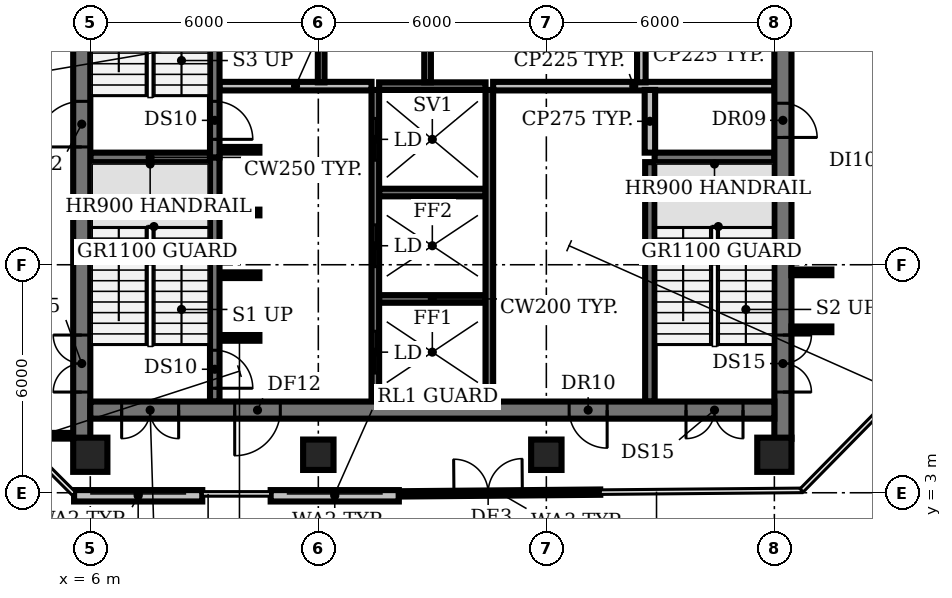
"""IFC4 building model, lengths in metres.
Left out: names, types, materials, properties, quantities, classifications, styles, units other than length and angle.
Written with IfcOpenShell. Run it as: python <this file> out.ifc"""

import sys

from ifc_helpers import new_model, si_unit, direction, frame, frame_2d, origin, origin_2d, place, context, subcontext, project, spatial, rectangle, circle, extrude, element, fill, save


model = new_model("IFC4")
c1 = context("Model", 3, precision=1e-05, world=origin(), true_north=direction((0.0, 1.0)))
c2 = subcontext(c1, "Body", "Model", "MODEL_VIEW")
j1 = project(units=[si_unit("LENGTHUNIT", "METRE"), si_unit("PLANEANGLEUNIT", "RADIAN")], contexts=[c1])
p1 = place(None, origin())
s1 = spatial("IfcSite", under=j1, at=p1, CompositionType="ELEMENT")
p2 = place(p1, origin())
s2 = spatial("IfcBuilding", under=s1, at=p2, CompositionType="ELEMENT")
p3 = place(p2, frame((0.0, 0.0, 226.4)))
s3 = spatial("IfcBuildingStorey", under=s2, at=p3, CompositionType="ELEMENT", Elevation=226.4)
p4 = place(p3, frame((6.0, 4.0, 0.0), z_axis=(0.0, 0.0, 1.0), x_axis=(1.0, 0.0, 0.0)))
e1 = element("IfcColumn", 1, at=p4, inside=s3, PredefinedType="COLUMN", context=c2, shape_type="SweptSolid", body=[
    extrude(circle(Radius=0.45, at=origin_2d()), origin(), (0.0, 0.0, 1.0), 3.85),
])
for number, where, z_axis, x_axis in (
    (2, (12.0, 4.0, 0.0), (0.0, 0.0, 1.0), (1.0, 0.0, 0.0)),
    (3, (18.0, 4.0, 0.0), (0.0, 0.0, 1.0), (1.0, 0.0, 0.0)),
):
    element("IfcColumn", number, at=place(p3, frame(where, z_axis=z_axis, x_axis=x_axis)), inside=s3, PredefinedType="COLUMN", context=c2, shape_type="SweptSolid", body=[
        extrude(rectangle(XDim=0.8, YDim=0.8, at=origin_2d()), origin(), (0.0, 0.0, 1.0), 3.85),
    ])
p5 = place(p3, frame((24.0, 4.0, 0.0), z_axis=(0.0, 0.0, 1.0), x_axis=(1.0, 0.0, 0.0)))
e4 = element("IfcColumn", 4, at=p5, inside=s3, PredefinedType="COLUMN", context=c2, shape_type="SweptSolid", body=[
    extrude(circle(Radius=0.45, at=origin_2d()), origin(), (0.0, 0.0, 1.0), 3.85),
])
p6 = place(p3, frame((5.573, 2.92, 0.0), z_axis=(0.0, 0.0, 1.0), x_axis=(1.0, 0.0, 0.0)))
e5 = element("IfcWall", 5, at=p6, inside=s3, PredefinedType="SOLIDWALL", context=c2, shape_type="SweptSolid", body=[
    extrude(rectangle(XDim=3.373, YDim=0.3, at=frame_2d((1.686, 0.0))), origin(), (0.0, 0.0, 1.0), 3.85),
])
p7 = place(p3, frame((10.746, 2.92, 0.0), z_axis=(0.0, 0.0, 1.0), x_axis=(1.0, 0.0, 0.0)))
e6 = element("IfcWall", 6, at=p7, inside=s3, PredefinedType="SOLIDWALL", context=c2, shape_type="SweptSolid", body=[
    extrude(rectangle(XDim=3.373, YDim=0.3, at=frame_2d((1.687, 0.0))), origin(), (0.0, 0.0, 1.0), 3.85),
])
p8 = place(p3, frame((14.119, 2.97, 0.0), z_axis=(0.0, 0.0, 1.0), x_axis=(0.999962093881, 0.00870693982, 0.0)))
e7 = element("IfcWall", 7, at=p8, inside=s3, PredefinedType="SOLIDWALL", context=c2, shape_type="SweptSolid", body=[
    extrude(rectangle(XDim=5.3, YDim=0.14, at=frame_2d((2.65, 0.0))), origin(), (0.0, 0.0, 1.0), 3.85),
])
p9 = place(p8, frame((1.45, 0.0, 0.0)))
e8 = element("IfcOpeningElement", 8, at=p9, cuts=e7, PredefinedType="OPENING", context=c2, shape_type="SweptSolid", body=[
    extrude(rectangle(XDim=1.8, YDim=2.4, at=frame_2d((0.9, 1.2))), frame((0.0, 0.08, 0.0), z_axis=(0.0, -1.0, 0.0), x_axis=(1.0, 0.0, 0.0)), (0.0, 0.0, 1.0), 0.16),
])
p10 = place(p3, frame((9.4, 7.075, 0.0), z_axis=(0.0, 0.0, 1.0), x_axis=(1.0, 0.0, 0.0)))
e9 = element("IfcWall", 9, at=p10, inside=s3, PredefinedType="SHEAR", context=c2, shape_type="SweptSolid", body=[
    extrude(rectangle(XDim=1.05, YDim=0.15, at=frame_2d((0.525, 0.0))), origin(), (0.0, 0.0, 1.0), 3.85),
])
p11 = place(p3, frame((13.6, 8.1, 0.0), z_axis=(0.0, 0.0, 1.0), x_axis=(1.0, 0.0, 0.0)))
e10 = element("IfcWall", 10, at=p11, inside=s3, PredefinedType="SHEAR", context=c2, shape_type="SweptSolid", body=[
    extrude(rectangle(XDim=2.8, YDim=0.2, at=frame_2d((1.4, 0.0))), origin(), (0.0, 0.0, 1.0), 3.85),
])
for number, where, z_axis, x_axis in (
    (11, (9.4, 8.725, 0.0), (0.0, 0.0, 1.0), (1.0, 0.0, 0.0)),
    (12, (9.4, 10.375, 0.0), (0.0, 0.0, 1.0), (1.0, 0.0, 0.0)),
):
    element("IfcWall", number, at=place(p3, frame(where, z_axis=z_axis, x_axis=x_axis)), inside=s3, PredefinedType="SHEAR", context=c2, shape_type="SweptSolid", body=[
        extrude(rectangle(XDim=1.05, YDim=0.15, at=frame_2d((0.525, 0.0))), origin(), (0.0, 0.0, 1.0), 3.85),
    ])
p12 = place(p3, frame((13.6, 10.9, 0.0), z_axis=(0.0, 0.0, 1.0), x_axis=(1.0, 0.0, 0.0)))
e13 = element("IfcWall", 13, at=p12, inside=s3, PredefinedType="SHEAR", context=c2, shape_type="SweptSolid", body=[
    extrude(rectangle(XDim=2.8, YDim=0.2, at=frame_2d((1.4, 0.0))), origin(), (0.0, 0.0, 1.0), 3.85),
])
for number, where, z_axis, x_axis in (
    (14, (6.0, 11.825, 0.0), (0.0, 0.0, 1.0), (1.0, 0.0, 0.0)),
    (15, (20.85, 11.825, 0.0), (0.0, 0.0, 1.0), (1.0, 0.0, 0.0)),
):
    element("IfcWall", number, at=place(p3, frame(where, z_axis=z_axis, x_axis=x_axis)), inside=s3, PredefinedType="SHEAR", context=c2, shape_type="SweptSolid", body=[
        extrude(rectangle(XDim=3.15, YDim=0.25, at=frame_2d((1.575, 0.0))), origin(), (0.0, 0.0, 1.0), 3.85),
    ])
p13 = place(p3, frame((9.4, 12.025, 0.0), z_axis=(0.0, 0.0, 1.0), x_axis=(1.0, 0.0, 0.0)))
e16 = element("IfcWall", 16, at=p13, inside=s3, PredefinedType="SHEAR", context=c2, shape_type="SweptSolid", body=[
    extrude(rectangle(XDim=1.05, YDim=0.15, at=frame_2d((0.525, 0.0))), origin(), (0.0, 0.0, 1.0), 3.85),
])
p14 = place(p3, frame((9.4, 13.7, 0.0), z_axis=(0.0, 0.0, 1.0), x_axis=(1.0, 0.0, 0.0)))
e17 = element("IfcWall", 17, at=p14, inside=s3, PredefinedType="PARTITIONING", context=c2, shape_type="SweptSolid", body=[
    extrude(rectangle(XDim=4.0, YDim=0.225, at=frame_2d((2.0, 0.0))), origin(), (0.0, 0.0, 1.0), 3.85),
])
p15 = place(p3, frame((13.6, 13.7, 0.0), z_axis=(0.0, 0.0, 1.0), x_axis=(1.0, 0.0, 0.0)))
e18 = element("IfcWall", 18, at=p15, inside=s3, PredefinedType="SHEAR", context=c2, shape_type="SweptSolid", body=[
    extrude(rectangle(XDim=2.8, YDim=0.2, at=frame_2d((1.4, 0.0))), origin(), (0.0, 0.0, 1.0), 3.85),
])
p16 = place(p3, frame((16.6, 13.7, 0.0), z_axis=(0.0, 0.0, 1.0), x_axis=(1.0, 0.0, 0.0)))
e19 = element("IfcWall", 19, at=p16, inside=s3, PredefinedType="PARTITIONING", context=c2, shape_type="SweptSolid", body=[
    extrude(rectangle(XDim=7.4, YDim=0.225, at=frame_2d((3.7, 0.0))), origin(), (0.0, 0.0, 1.0), 3.85),
])
p17 = place(p3, frame((9.275, 11.825, 0.0), z_axis=(0.0, 0.0, 1.0), x_axis=(0.0, -1.0, 0.0)))
e20 = element("IfcWall", 20, at=p17, inside=s3, PredefinedType="SHEAR", context=c2, shape_type="SweptSolid", body=[
    extrude(rectangle(XDim=6.425, YDim=0.25, at=frame_2d((3.212, 0.0))), origin(), (0.0, 0.0, 1.0), 3.85),
])
p18 = place(p17, frame((5.075, 0.0, 0.0)))
e21 = element("IfcOpeningElement", 21, at=p18, cuts=e20, PredefinedType="OPENING", context=c2, shape_type="SweptSolid", body=[
    extrude(rectangle(XDim=1.0, YDim=2.1, at=frame_2d((0.5, 1.05))), frame((0.0, 0.135, 0.0), z_axis=(0.0, -1.0, 0.0), x_axis=(1.0, 0.0, 0.0)), (0.0, 0.0, 1.0), 0.27),
])
p19 = place(p3, frame((9.275, 18.375, 0.0), z_axis=(0.0, 0.0, 1.0), x_axis=(0.0, -1.0, 0.0)))
e22 = element("IfcWall", 22, at=p19, inside=s3, PredefinedType="SHEAR", context=c2, shape_type="SweptSolid", body=[
    extrude(rectangle(XDim=6.55, YDim=0.25, at=frame_2d((3.275, 0.0))), origin(), (0.0, 0.0, 1.0), 3.85),
])
p20 = place(p19, frame((5.075, 0.0, 0.0)))
e23 = element("IfcOpeningElement", 23, at=p20, cuts=e22, PredefinedType="OPENING", context=c2, shape_type="SweptSolid", body=[
    extrude(rectangle(XDim=1.0, YDim=2.1, at=frame_2d((0.5, 1.05))), frame((0.0, 0.135, 0.0), z_axis=(0.0, -1.0, 0.0), x_axis=(1.0, 0.0, 0.0)), (0.0, 0.0, 1.0), 0.27),
])
p21 = place(p3, frame((12.075, 13.8, 0.0), z_axis=(0.0, 0.0, 1.0), x_axis=(0.0, 1.0, 0.0)))
e24 = element("IfcWall", 24, at=p21, inside=s3, PredefinedType="PARTITIONING", context=c2, shape_type="SweptSolid", body=[
    extrude(rectangle(XDim=2.6, YDim=0.175, at=frame_2d((1.3, 0.0))), origin(), (0.0, 0.0, 1.0), 3.85),
])
p22 = place(p3, frame((13.5, 5.4, 0.0), z_axis=(0.0, 0.0, 1.0), x_axis=(0.0, 1.0, 0.0)))
e25 = element("IfcWall", 25, at=p22, inside=s3, PredefinedType="SHEAR", context=c2, shape_type="SweptSolid", body=[
    extrude(rectangle(XDim=8.2, YDim=0.2, at=frame_2d((4.1, 0.0))), origin(), (0.0, 0.0, 1.0), 3.85),
])
p23 = place(p22, frame((0.75, 0.0, 0.0)))
e26 = element("IfcOpeningElement", 26, at=p23, cuts=e25, PredefinedType="OPENING", context=c2, shape_type="SweptSolid", body=[
    extrude(rectangle(XDim=1.1, YDim=2.1, at=frame_2d((0.55, 1.05))), frame((0.0, 0.11, 0.0), z_axis=(0.0, -1.0, 0.0), x_axis=(1.0, 0.0, 0.0)), (0.0, 0.0, 1.0), 0.22),
])
p24 = place(p22, frame((3.55, 0.0, 0.0)))
e27 = element("IfcOpeningElement", 27, at=p24, cuts=e25, PredefinedType="OPENING", context=c2, shape_type="SweptSolid", body=[
    extrude(rectangle(XDim=1.1, YDim=2.1, at=frame_2d((0.55, 1.05))), frame((0.0, 0.11, 0.0), z_axis=(0.0, -1.0, 0.0), x_axis=(1.0, 0.0, 0.0)), (0.0, 0.0, 1.0), 0.22),
])
p25 = place(p22, frame((6.35, 0.0, 0.0)))
e28 = element("IfcOpeningElement", 28, at=p25, cuts=e25, PredefinedType="OPENING", context=c2, shape_type="SweptSolid", body=[
    extrude(rectangle(XDim=1.1, YDim=2.1, at=frame_2d((0.55, 1.05))), frame((0.0, 0.11, 0.0), z_axis=(0.0, -1.0, 0.0), x_axis=(1.0, 0.0, 0.0)), (0.0, 0.0, 1.0), 0.22),
])
p26 = place(p3, frame((14.875, 13.8, 0.0), z_axis=(0.0, 0.0, 1.0), x_axis=(0.0, 1.0, 0.0)))
e29 = element("IfcWall", 29, at=p26, inside=s3, PredefinedType="PARTITIONING", context=c2, shape_type="SweptSolid", body=[
    extrude(rectangle(XDim=2.6, YDim=0.175, at=frame_2d((1.3, 0.0))), origin(), (0.0, 0.0, 1.0), 3.85),
])
p27 = place(p3, frame((16.5, 5.4, 0.0), z_axis=(0.0, 0.0, 1.0), x_axis=(0.0, 1.0, 0.0)))
e30 = element("IfcWall", 30, at=p27, inside=s3, PredefinedType="SHEAR", context=c2, shape_type="SweptSolid", body=[
    extrude(rectangle(XDim=8.2, YDim=0.2, at=frame_2d((4.1, 0.0))), origin(), (0.0, 0.0, 1.0), 3.85),
])
p28 = place(p3, frame((20.5, 13.8, 0.0), z_axis=(0.0, 0.0, 1.0), x_axis=(0.0, 1.0, 0.0)))
e31 = element("IfcWall", 31, at=p28, inside=s3, PredefinedType="PARTITIONING", context=c2, shape_type="SweptSolid", body=[
    extrude(rectangle(XDim=2.6, YDim=0.225, at=frame_2d((1.3, 0.0))), origin(), (0.0, 0.0, 1.0), 3.85),
])
p29 = place(p3, frame((20.725, 5.4, 0.0), z_axis=(0.0, 0.0, 1.0), x_axis=(0.0, 1.0, 0.0)))
e32 = element("IfcWall", 32, at=p29, inside=s3, PredefinedType="SHEAR", context=c2, shape_type="SweptSolid", body=[
    extrude(rectangle(XDim=6.3, YDim=0.25, at=frame_2d((3.15, 0.0))), origin(), (0.0, 0.0, 1.0), 3.85),
])
p30 = place(p3, frame((20.725, 11.95, 0.0), z_axis=(0.0, 0.0, 1.0), x_axis=(0.0, 1.0, 0.0)))
e33 = element("IfcWall", 33, at=p30, inside=s3, PredefinedType="PARTITIONING", context=c2, shape_type="SweptSolid", body=[
    extrude(rectangle(XDim=1.65, YDim=0.275, at=frame_2d((0.825, 0.0))), origin(), (0.0, 0.0, 1.0), 3.85),
])
p31 = place(p3, frame((5.775, 4.42, 0.0), z_axis=(0.0, 0.0, 1.0), x_axis=(0.0, 1.0, 0.0)))
e34 = element("IfcWall", 34, at=p31, inside=s3, PredefinedType="SHEAR", context=c2, shape_type="SweptSolid", body=[
    extrude(rectangle(XDim=20.83, YDim=0.45, at=frame_2d((10.415, 0.0))), origin(), (0.0, 0.0, 1.0), 3.85),
])
p32 = place(p31, frame((1.23, 0.0, 0.0)))
e35 = element("IfcOpeningElement", 35, at=p32, cuts=e34, PredefinedType="OPENING", context=c2, shape_type="SweptSolid", body=[
    extrude(rectangle(XDim=1.5, YDim=2.1, at=frame_2d((0.75, 1.05))), frame((0.0, 0.235, 0.0), z_axis=(0.0, -1.0, 0.0), x_axis=(1.0, 0.0, 0.0)), (0.0, 0.0, 1.0), 0.47),
])
p33 = place(p31, frame((7.68, 0.0, 0.0)))
e36 = element("IfcOpeningElement", 36, at=p33, cuts=e34, PredefinedType="OPENING", context=c2, shape_type="SweptSolid", body=[
    extrude(rectangle(XDim=1.2, YDim=2.1, at=frame_2d((0.6, 1.05))), frame((0.0, 0.235, 0.0), z_axis=(0.0, -1.0, 0.0), x_axis=(1.0, 0.0, 0.0)), (0.0, 0.0, 1.0), 0.47),
])
p34 = place(p31, frame((14.23, 0.0, 0.0)))
e37 = element("IfcOpeningElement", 37, at=p34, cuts=e34, PredefinedType="OPENING", context=c2, shape_type="SweptSolid", body=[
    extrude(rectangle(XDim=1.2, YDim=2.1, at=frame_2d((0.6, 1.05))), frame((0.0, 0.235, 0.0), z_axis=(0.0, -1.0, 0.0), x_axis=(1.0, 0.0, 0.0)), (0.0, 0.0, 1.0), 0.47),
])
p35 = place(p3, frame((24.225, 25.25, 0.0), z_axis=(0.0, 0.0, 1.0), x_axis=(0.0, -1.0, 0.0)))
e38 = element("IfcWall", 38, at=p35, inside=s3, PredefinedType="SHEAR", context=c2, shape_type="SweptSolid", body=[
    extrude(rectangle(XDim=20.83, YDim=0.45, at=frame_2d((10.415, 0.0))), origin(), (0.0, 0.0, 1.0), 3.85),
])
p36 = place(p35, frame((18.1, 0.0, 0.0)))
e39 = element("IfcOpeningElement", 39, at=p36, cuts=e38, PredefinedType="OPENING", context=c2, shape_type="SweptSolid", body=[
    extrude(rectangle(XDim=1.5, YDim=2.1, at=frame_2d((0.75, 1.05))), frame((0.0, 0.235, 0.0), z_axis=(0.0, -1.0, 0.0), x_axis=(1.0, 0.0, 0.0)), (0.0, 0.0, 1.0), 0.47),
])
p37 = place(p35, frame((12.0, 0.0, 0.0)))
e40 = element("IfcOpeningElement", 40, at=p37, cuts=e38, PredefinedType="OPENING", context=c2, shape_type="SweptSolid", body=[
    extrude(rectangle(XDim=0.9, YDim=2.1, at=frame_2d((0.45, 1.05))), frame((0.0, 0.235, 0.0), z_axis=(0.0, -1.0, 0.0), x_axis=(1.0, 0.0, 0.0)), (0.0, 0.0, 1.0), 0.47),
])
p38 = place(p35, frame((6.0, 0.0, 0.0)))
e41 = element("IfcOpeningElement", 41, at=p38, cuts=e38, PredefinedType="OPENING", context=c2, shape_type="SweptSolid", body=[
    extrude(rectangle(XDim=2.0, YDim=2.1, at=frame_2d((1.0, 1.05))), frame((0.0, 0.235, 0.0), z_axis=(0.0, -1.0, 0.0), x_axis=(1.0, 0.0, 0.0)), (0.0, 0.0, 1.0), 0.47),
])
p39 = place(p3, frame((24.0, 5.175, 0.0), z_axis=(0.0, 0.0, 1.0), x_axis=(-1.0, 0.0, 0.0)))
e42 = element("IfcWall", 42, at=p39, inside=s3, PredefinedType="SHEAR", context=c2, shape_type="SweptSolid", body=[
    extrude(rectangle(XDim=18.0, YDim=0.45, at=frame_2d((9.0, 0.0))), origin(), (0.0, 0.0, 1.0), 3.85),
])
p40 = place(p39, frame((0.825, 0.0, 0.0)))
e43 = element("IfcOpeningElement", 43, at=p40, cuts=e42, PredefinedType="OPENING", context=c2, shape_type="SweptSolid", body=[
    extrude(rectangle(XDim=1.5, YDim=2.1, at=frame_2d((0.75, 1.05))), frame((0.0, 0.235, 0.0), z_axis=(0.0, -1.0, 0.0), x_axis=(1.0, 0.0, 0.0)), (0.0, 0.0, 1.0), 0.47),
])
p41 = place(p39, frame((15.675, 0.0, 0.0)))
e44 = element("IfcOpeningElement", 44, at=p41, cuts=e42, PredefinedType="OPENING", context=c2, shape_type="SweptSolid", body=[
    extrude(rectangle(XDim=1.5, YDim=2.1, at=frame_2d((0.75, 1.05))), frame((0.0, 0.235, 0.0), z_axis=(0.0, -1.0, 0.0), x_axis=(1.0, 0.0, 0.0)), (0.0, 0.0, 1.0), 0.47),
])
p42 = place(p39, frame((13.0, 0.0, 0.0)))
e45 = element("IfcOpeningElement", 45, at=p42, cuts=e42, PredefinedType="OPENING", context=c2, shape_type="SweptSolid", body=[
    extrude(rectangle(XDim=1.2, YDim=2.1, at=frame_2d((0.6, 1.05))), frame((0.0, 0.235, 0.0), z_axis=(0.0, -1.0, 0.0), x_axis=(1.0, 0.0, 0.0)), (0.0, 0.0, 1.0), 0.47),
])
p43 = place(p39, frame((4.4, 0.0, 0.0)))
e46 = element("IfcOpeningElement", 46, at=p43, cuts=e42, PredefinedType="OPENING", context=c2, shape_type="SweptSolid", body=[
    extrude(rectangle(XDim=1.0, YDim=2.1, at=frame_2d((0.5, 1.05))), frame((0.0, 0.235, 0.0), z_axis=(0.0, -1.0, 0.0), x_axis=(1.0, 0.0, 0.0)), (0.0, 0.0, 1.0), 0.47),
])
p44 = place(p3, frame((4.11, 4.5, 0.0), z_axis=(0.0, 0.0, 1.0), x_axis=(1.0, 0.0, 0.0)))
e47 = element("IfcWall", 47, at=p44, inside=s3, PredefinedType="PARTITIONING", context=c2, shape_type="SweptSolid", body=[
    extrude(rectangle(XDim=1.34, YDim=0.15, at=frame_2d((0.67, 0.0))), origin(), (0.0, 0.0, 1.0), 2.88),
])
for number, where, z_axis, x_axis in (
    (48, (24.45, 7.3, 0.0), (0.0, 0.0, 1.0), (1.0, 0.0, 0.0)),
    (49, (24.45, 8.8, 0.0), (0.0, 0.0, 1.0), (1.0, 0.0, 0.0)),
):
    element("IfcWall", number, at=place(p3, frame(where, z_axis=z_axis, x_axis=x_axis)), inside=s3, PredefinedType="PARTITIONING", context=c2, shape_type="SweptSolid", body=[
        extrude(rectangle(XDim=1.05, YDim=0.15, at=frame_2d((0.525, 0.0))), origin(), (0.0, 0.0, 1.0), 2.88),
    ])
p45 = place(p9, origin())
e50 = element("IfcDoor", 50, at=p45, inside=s3, OperationType="DOUBLE_DOOR_DOUBLE_SWING", PredefinedType="DOOR", context=c2, shape_type="SweptSolid", body=[
    extrude(rectangle(XDim=1.8, YDim=2.4, at=frame_2d((0.9, 1.2))), frame((0.0, 0.025, 0.0), z_axis=(0.0, -1.0, 0.0), x_axis=(1.0, 0.0, 0.0)), (0.0, 0.0, 1.0), 0.05),
])
fill(e8, e50)
p46 = place(p18, origin())
e51 = element("IfcDoor", 51, at=p46, inside=s3, OperationType="SINGLE_SWING_RIGHT", PredefinedType="DOOR", context=c2, shape_type="SweptSolid", body=[
    extrude(rectangle(XDim=1.0, YDim=2.1, at=frame_2d((0.5, 1.05))), frame((0.0, 0.025, 0.0), z_axis=(0.0, -1.0, 0.0), x_axis=(1.0, 0.0, 0.0)), (0.0, 0.0, 1.0), 0.05),
])
fill(e21, e51)
p47 = place(p20, origin())
e52 = element("IfcDoor", 52, at=p47, inside=s3, OperationType="SINGLE_SWING_RIGHT", PredefinedType="DOOR", context=c2, shape_type="SweptSolid", body=[
    extrude(rectangle(XDim=1.0, YDim=2.1, at=frame_2d((0.5, 1.05))), frame((0.0, 0.025, 0.0), z_axis=(0.0, -1.0, 0.0), x_axis=(1.0, 0.0, 0.0)), (0.0, 0.0, 1.0), 0.05),
])
fill(e23, e52)
p48 = place(p23, origin())
e53 = element("IfcDoor", 53, at=p48, inside=s3, OperationType="DOUBLE_DOOR_SLIDING", PredefinedType="DOOR", context=c2, shape_type="SweptSolid", body=[
    extrude(rectangle(XDim=1.1, YDim=2.1, at=frame_2d((0.55, 1.05))), frame((0.0, 0.025, 0.0), z_axis=(0.0, -1.0, 0.0), x_axis=(1.0, 0.0, 0.0)), (0.0, 0.0, 1.0), 0.05),
])
fill(e26, e53)
p49 = place(p24, origin())
e54 = element("IfcDoor", 54, at=p49, inside=s3, OperationType="DOUBLE_DOOR_SLIDING", PredefinedType="DOOR", context=c2, shape_type="SweptSolid", body=[
    extrude(rectangle(XDim=1.1, YDim=2.1, at=frame_2d((0.55, 1.05))), frame((0.0, 0.025, 0.0), z_axis=(0.0, -1.0, 0.0), x_axis=(1.0, 0.0, 0.0)), (0.0, 0.0, 1.0), 0.05),
])
fill(e27, e54)
p50 = place(p25, origin())
e55 = element("IfcDoor", 55, at=p50, inside=s3, OperationType="DOUBLE_DOOR_SLIDING", PredefinedType="DOOR", context=c2, shape_type="SweptSolid", body=[
    extrude(rectangle(XDim=1.1, YDim=2.1, at=frame_2d((0.55, 1.05))), frame((0.0, 0.025, 0.0), z_axis=(0.0, -1.0, 0.0), x_axis=(1.0, 0.0, 0.0)), (0.0, 0.0, 1.0), 0.05),
])
fill(e28, e55)
p51 = place(p32, origin())
e56 = element("IfcDoor", 56, at=p51, inside=s3, OperationType="DOUBLE_DOOR_SINGLE_SWING", PredefinedType="DOOR", context=c2, shape_type="SweptSolid", body=[
    extrude(rectangle(XDim=1.5, YDim=2.1, at=frame_2d((0.75, 1.05))), frame((0.0, 0.025, 0.0), z_axis=(0.0, -1.0, 0.0), x_axis=(1.0, 0.0, 0.0)), (0.0, 0.0, 1.0), 0.05),
])
fill(e35, e56)
p52 = place(p33, origin())
e57 = element("IfcDoor", 57, at=p52, inside=s3, OperationType="SINGLE_SWING_LEFT", PredefinedType="DOOR", context=c2, shape_type="SweptSolid", body=[
    extrude(rectangle(XDim=1.2, YDim=2.1, at=frame_2d((0.6, 1.05))), frame((0.0, 0.025, 0.0), z_axis=(0.0, -1.0, 0.0), x_axis=(1.0, 0.0, 0.0)), (0.0, 0.0, 1.0), 0.05),
])
fill(e36, e57)
p53 = place(p36, origin())
e58 = element("IfcDoor", 58, at=p53, inside=s3, OperationType="DOUBLE_DOOR_SINGLE_SWING", PredefinedType="DOOR", context=c2, shape_type="SweptSolid", body=[
    extrude(rectangle(XDim=1.5, YDim=2.1, at=frame_2d((0.75, 1.05))), frame((0.0, 0.025, 0.0), z_axis=(0.0, -1.0, 0.0), x_axis=(1.0, 0.0, 0.0)), (0.0, 0.0, 1.0), 0.05),
])
fill(e39, e58)
p54 = place(p37, origin())
e59 = element("IfcDoor", 59, at=p54, inside=s3, OperationType="SINGLE_SWING_RIGHT", PredefinedType="DOOR", context=c2, shape_type="SweptSolid", body=[
    extrude(rectangle(XDim=0.9, YDim=2.1, at=frame_2d((0.45, 1.05))), frame((0.0, 0.025, 0.0), z_axis=(0.0, -1.0, 0.0), x_axis=(1.0, 0.0, 0.0)), (0.0, 0.0, 1.0), 0.05),
])
fill(e40, e59)
p55 = place(p40, origin())
e60 = element("IfcDoor", 60, at=p55, inside=s3, OperationType="DOUBLE_DOOR_SINGLE_SWING", PredefinedType="DOOR", context=c2, shape_type="SweptSolid", body=[
    extrude(rectangle(XDim=1.5, YDim=2.1, at=frame_2d((0.75, 1.05))), frame((0.0, 0.025, 0.0), z_axis=(0.0, -1.0, 0.0), x_axis=(1.0, 0.0, 0.0)), (0.0, 0.0, 1.0), 0.05),
])
fill(e43, e60)
p56 = place(p41, origin())
e61 = element("IfcDoor", 61, at=p56, inside=s3, OperationType="DOUBLE_DOOR_SINGLE_SWING", PredefinedType="DOOR", context=c2, shape_type="SweptSolid", body=[
    extrude(rectangle(XDim=1.5, YDim=2.1, at=frame_2d((0.75, 1.05))), frame((0.0, 0.025, 0.0), z_axis=(0.0, -1.0, 0.0), x_axis=(1.0, 0.0, 0.0)), (0.0, 0.0, 1.0), 0.05),
])
fill(e44, e61)
p57 = place(p42, origin())
e62 = element("IfcDoor", 62, at=p57, inside=s3, OperationType="SINGLE_SWING_RIGHT", PredefinedType="DOOR", context=c2, shape_type="SweptSolid", body=[
    extrude(rectangle(XDim=1.2, YDim=2.1, at=frame_2d((0.6, 1.05))), frame((0.0, 0.025, 0.0), z_axis=(0.0, -1.0, 0.0), x_axis=(1.0, 0.0, 0.0)), (0.0, 0.0, 1.0), 0.05),
])
fill(e45, e62)
p58 = place(p43, origin())
e63 = element("IfcDoor", 63, at=p58, inside=s3, OperationType="SINGLE_SWING_LEFT", PredefinedType="DOOR", context=c2, shape_type="SweptSolid", body=[
    extrude(rectangle(XDim=1.0, YDim=2.1, at=frame_2d((0.5, 1.05))), frame((0.0, 0.025, 0.0), z_axis=(0.0, -1.0, 0.0), x_axis=(1.0, 0.0, 0.0)), (0.0, 0.0, 1.0), 0.05),
])
fill(e46, e63)
save(model, sys.argv[1])
